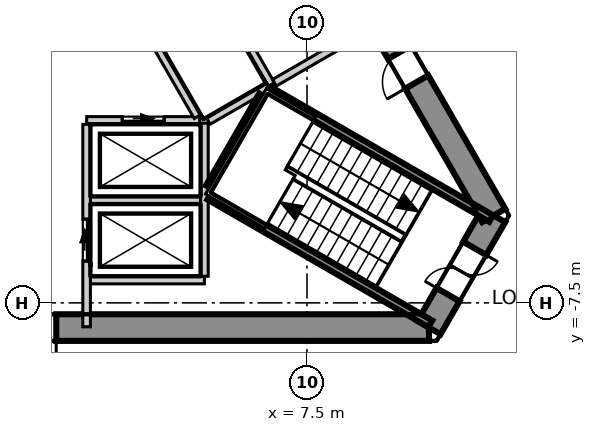
"""IFC4 building model, lengths in metres.
Left out: names, types, materials, properties, quantities, classifications, styles, units other than length and angle.
Written with IfcOpenShell. Run it as: python <this file> out.ifc"""

import sys

from ifc_helpers import new_model, si_unit, direction, frame, frame_2d, origin, place, context, subcontext, project, spatial, polyline, rectangle, outline, extrude, element, fill, save


model = new_model("IFC4")
c1 = context("Model", 3, precision=1e-05, world=origin(), true_north=direction((0.0, 1.0)))
c2 = subcontext(c1, "Body", "Model", "MODEL_VIEW")
j1 = project(units=[si_unit("LENGTHUNIT", "METRE"), si_unit("PLANEANGLEUNIT", "RADIAN")], contexts=[c1])
p1 = place(None, origin())
s1 = spatial("IfcSite", under=j1, at=p1, CompositionType="ELEMENT")
p2 = place(p1, origin())
s2 = spatial("IfcBuilding", under=s1, at=p2, CompositionType="ELEMENT")
p3 = place(p2, frame((0.0, 0.0, 227.3)))
s3 = spatial("IfcBuildingStorey", under=s2, at=p3, CompositionType="ELEMENT", Elevation=227.3)
p4 = place(p3, frame((-10.71, -8.15, -0.3), z_axis=(0.0, 0.0, 1.0), x_axis=(1.0, 0.0, 0.0)))
e1 = element("IfcWall", 1, at=p4, inside=s3, PredefinedType="SHEAR", context=c2, shape_type="SweptSolid", body=[
    extrude(outline(polyline([(-0.202, -0.35), (1.782, -0.35), (3.766, -0.35), (5.75, -0.35), (7.734, -0.35), (9.718, -0.35), (11.702, -0.35), (13.686, -0.35), (15.67, -0.35), (17.654, -0.35), (19.638, -0.35), (21.622, -0.35), (21.218, 0.35), (19.307, 0.35), (17.397, 0.35), (15.486, 0.35), (13.576, 0.35), (11.665, 0.35), (9.755, 0.35), (7.844, 0.35), (5.934, 0.35), (4.023, 0.35), (2.113, 0.35), (0.202, 0.35), (-0.202, -0.35)])), origin(), (0.0, 0.0, 1.0), 4.0),
])
p5 = place(p4, frame((9.81, 0.0, 0.3)))
e2 = element("IfcOpeningElement", 2, at=p5, cuts=e1, PredefinedType="OPENING", context=c2, shape_type="SweptSolid", body=[
    extrude(rectangle(XDim=1.8, YDim=2.1, at=frame_2d((0.9, 1.05))), frame((0.0, 0.36, 0.0), z_axis=(0.0, -1.0, 0.0), x_axis=(1.0, 0.0, 0.0)), (0.0, 0.0, 1.0), 0.72),
])
p6 = place(p3, frame((10.71, -8.15, -0.3), z_axis=(0.0, 0.0, 1.0), x_axis=(0.49999337185, 0.866029230515, 0.0)))
e3 = element("IfcWall", 3, at=p6, inside=s3, PredefinedType="SHEAR", context=c2, shape_type="SweptSolid", body=[
    extrude(outline(polyline([(-0.202, -0.35), (1.703, -0.35), (3.608, -0.35), (3.204, 0.35), (1.703, 0.35), (0.202, 0.35), (-0.202, -0.35)])), origin(), (0.0, 0.0, 1.0), 4.0),
])
p7 = place(p6, frame((1.003, 0.0, 0.3)))
e4 = element("IfcOpeningElement", 4, at=p7, cuts=e3, PredefinedType="OPENING", context=c2, shape_type="SweptSolid", body=[
    extrude(rectangle(XDim=1.4, YDim=2.1, at=frame_2d((0.7, 1.05))), frame((0.0, 0.36, 0.0), z_axis=(0.0, -1.0, 0.0), x_axis=(1.0, 0.0, 0.0)), (0.0, 0.0, 1.0), 0.72),
])
p8 = place(p3, frame((12.413, -5.2, -0.3), z_axis=(0.0, 0.0, 1.0), x_axis=(-0.500011533395, 0.866018744874, 0.0)))
e5 = element("IfcWall", 5, at=p8, inside=s3, PredefinedType="SHEAR", context=c2, shape_type="SweptSolid", body=[
    extrude(outline(polyline([(-0.202, -0.35), (1.782, -0.35), (3.766, -0.35), (5.75, -0.35), (7.734, -0.35), (9.718, -0.35), (11.702, -0.35), (13.686, -0.35), (15.67, -0.35), (17.654, -0.35), (19.638, -0.35), (21.622, -0.35), (21.218, 0.35), (19.307, 0.35), (17.397, 0.35), (15.486, 0.35), (13.576, 0.35), (11.665, 0.35), (9.755, 0.35), (7.844, 0.35), (5.934, 0.35), (4.023, 0.35), (2.113, 0.35), (0.202, 0.35), (-0.202, -0.35)])), origin(), (0.0, 0.0, 1.0), 4.0),
])
p9 = place(p8, frame((4.055, 0.0, 0.3)))
e6 = element("IfcOpeningElement", 6, at=p9, cuts=e5, PredefinedType="OPENING", context=c2, shape_type="SweptSolid", body=[
    extrude(rectangle(XDim=0.9, YDim=2.1, at=frame_2d((0.45, 1.05))), frame((0.0, 0.36, 0.0), z_axis=(0.0, -1.0, 0.0), x_axis=(1.0, 0.0, 0.0)), (0.0, 0.0, 1.0), 0.72),
])
p10 = place(p8, frame((16.415, 0.0, 0.3)))
e7 = element("IfcOpeningElement", 7, at=p10, cuts=e5, PredefinedType="OPENING", context=c2, shape_type="SweptSolid", body=[
    extrude(rectangle(XDim=1.0, YDim=2.1, at=frame_2d((0.5, 1.05))), frame((0.0, 0.36, 0.0), z_axis=(0.0, -1.0, 0.0), x_axis=(1.0, 0.0, 0.0)), (0.0, 0.0, 1.0), 0.72),
])
p11 = place(p3, frame((27.782, -12.884, 0.0), z_axis=(0.0, 0.0, 1.0), x_axis=(-0.500023345841, 0.866011924637, 0.0)))
e8 = element("IfcWall", 8, at=p11, inside=s3, PredefinedType="ELEMENTEDWALL", context=c2, shape_type="SweptSolid", body=[
    extrude(rectangle(XDim=50.078, YDim=0.2, at=frame_2d((25.039, 0.0))), origin(), (0.0, 0.0, 1.0), 3.7),
])
p12 = place(p11, frame((2.171, 0.0, 0.9)))
e9 = element("IfcOpeningElement", 9, at=p12, cuts=e8, PredefinedType="OPENING", context=c2, shape_type="SweptSolid", body=[
    extrude(rectangle(XDim=4.2, YDim=2.5, at=frame_2d((2.1, 1.25))), frame((0.0, 0.11, 0.0), z_axis=(0.0, -1.0, 0.0), x_axis=(1.0, 0.0, 0.0)), (0.0, 0.0, 1.0), 0.22),
])
p13 = place(p11, frame((8.108, 0.0, 0.9)))
e10 = element("IfcOpeningElement", 10, at=p13, cuts=e8, PredefinedType="OPENING", context=c2, shape_type="SweptSolid", body=[
    extrude(rectangle(XDim=4.2, YDim=2.5, at=frame_2d((2.1, 1.25))), frame((0.0, 0.11, 0.0), z_axis=(0.0, -1.0, 0.0), x_axis=(1.0, 0.0, 0.0)), (0.0, 0.0, 1.0), 0.22),
])
p14 = place(p11, frame((14.044, 0.0, 0.9)))
e11 = element("IfcOpeningElement", 11, at=p14, cuts=e8, PredefinedType="OPENING", context=c2, shape_type="SweptSolid", body=[
    extrude(rectangle(XDim=4.2, YDim=2.5, at=frame_2d((2.1, 1.25))), frame((0.0, 0.11, 0.0), z_axis=(0.0, -1.0, 0.0), x_axis=(1.0, 0.0, 0.0)), (0.0, 0.0, 1.0), 0.22),
])
p15 = place(p11, frame((19.981, 0.0, 0.9)))
e12 = element("IfcOpeningElement", 12, at=p15, cuts=e8, PredefinedType="OPENING", context=c2, shape_type="SweptSolid", body=[
    extrude(rectangle(XDim=4.2, YDim=2.5, at=frame_2d((2.1, 1.25))), frame((0.0, 0.11, 0.0), z_axis=(0.0, -1.0, 0.0), x_axis=(1.0, 0.0, 0.0)), (0.0, 0.0, 1.0), 0.22),
])
p16 = place(p11, frame((25.917, 0.0, 0.9)))
e13 = element("IfcOpeningElement", 13, at=p16, cuts=e8, PredefinedType="OPENING", context=c2, shape_type="SweptSolid", body=[
    extrude(rectangle(XDim=4.2, YDim=2.5, at=frame_2d((2.1, 1.25))), frame((0.0, 0.11, 0.0), z_axis=(0.0, -1.0, 0.0), x_axis=(1.0, 0.0, 0.0)), (0.0, 0.0, 1.0), 0.22),
])
p17 = place(p11, frame((31.854, 0.0, 0.9)))
e14 = element("IfcOpeningElement", 14, at=p17, cuts=e8, PredefinedType="OPENING", context=c2, shape_type="SweptSolid", body=[
    extrude(rectangle(XDim=4.2, YDim=2.5, at=frame_2d((2.1, 1.25))), frame((0.0, 0.11, 0.0), z_axis=(0.0, -1.0, 0.0), x_axis=(1.0, 0.0, 0.0)), (0.0, 0.0, 1.0), 0.22),
])
p18 = place(p11, frame((37.79, 0.0, 0.9)))
e15 = element("IfcOpeningElement", 15, at=p18, cuts=e8, PredefinedType="OPENING", context=c2, shape_type="SweptSolid", body=[
    extrude(rectangle(XDim=4.2, YDim=2.5, at=frame_2d((2.1, 1.25))), frame((0.0, 0.11, 0.0), z_axis=(0.0, -1.0, 0.0), x_axis=(1.0, 0.0, 0.0)), (0.0, 0.0, 1.0), 0.22),
])
p19 = place(p11, frame((43.727, 0.0, 0.9)))
e16 = element("IfcOpeningElement", 16, at=p19, cuts=e8, PredefinedType="OPENING", context=c2, shape_type="SweptSolid", body=[
    extrude(rectangle(XDim=4.2, YDim=2.5, at=frame_2d((2.1, 1.25))), frame((0.0, 0.11, 0.0), z_axis=(0.0, -1.0, 0.0), x_axis=(1.0, 0.0, 0.0)), (0.0, 0.0, 1.0), 0.22),
])
p20 = place(p3, frame((0.075, 24.07, 0.0), z_axis=(0.0, 0.0, 1.0), x_axis=(0.49999939571, -0.866025752671, 0.0)))
e17 = element("IfcWall", 17, at=p20, inside=s3, PredefinedType="PARTITIONING", context=c2, shape_type="SweptSolid", body=[
    extrude(rectangle(XDim=41.614, YDim=0.15, at=frame_2d((20.807, 0.0))), origin(), (0.0, 0.0, 1.0), 3.7),
])
p21 = place(p20, frame((36.714, 0.0, 0.0)))
e18 = element("IfcOpeningElement", 18, at=p21, cuts=e17, PredefinedType="OPENING", context=c2, shape_type="SweptSolid", body=[
    extrude(rectangle(XDim=1.1, YDim=2.1, at=frame_2d((0.55, 1.05))), frame((0.0, 0.085, 0.0), z_axis=(0.0, -1.0, 0.0), x_axis=(1.0, 0.0, 0.0)), (0.0, 0.0, 1.0), 0.17),
])
p22 = place(p20, frame((21.831, 0.0, 0.0)))
e19 = element("IfcOpeningElement", 19, at=p22, cuts=e17, PredefinedType="OPENING", context=c2, shape_type="SweptSolid", body=[
    extrude(rectangle(XDim=1.1, YDim=2.1, at=frame_2d((0.55, 1.05))), frame((0.0, 0.085, 0.0), z_axis=(0.0, -1.0, 0.0), x_axis=(1.0, 0.0, 0.0)), (0.0, 0.0, 1.0), 0.17),
])
p23 = place(p20, frame((30.631, 0.0, 0.0)))
e20 = element("IfcOpeningElement", 20, at=p23, cuts=e17, PredefinedType="OPENING", context=c2, shape_type="SweptSolid", body=[
    extrude(rectangle(XDim=0.9, YDim=2.1, at=frame_2d((0.45, 1.05))), frame((0.0, 0.085, 0.0), z_axis=(0.0, -1.0, 0.0), x_axis=(1.0, 0.0, 0.0)), (0.0, 0.0, 1.0), 0.17),
])
p24 = place(p20, frame((27.431, 0.0, 0.0)))
e21 = element("IfcOpeningElement", 21, at=p24, cuts=e17, PredefinedType="OPENING", context=c2, shape_type="SweptSolid", body=[
    extrude(rectangle(XDim=0.9, YDim=2.1, at=frame_2d((0.45, 1.05))), frame((0.0, 0.085, 0.0), z_axis=(0.0, -1.0, 0.0), x_axis=(1.0, 0.0, 0.0)), (0.0, 0.0, 1.0), 0.17),
])
p25 = place(p20, frame((24.631, 0.0, 0.0)))
e22 = element("IfcOpeningElement", 22, at=p25, cuts=e17, PredefinedType="OPENING", context=c2, shape_type="SweptSolid", body=[
    extrude(rectangle(XDim=1.0, YDim=2.1, at=frame_2d((0.5, 1.05))), frame((0.0, 0.085, 0.0), z_axis=(0.0, -1.0, 0.0), x_axis=(1.0, 0.0, 0.0)), (0.0, 0.0, 1.0), 0.17),
])
p26 = place(p20, frame((14.358, 0.0, 0.0)))
e23 = element("IfcOpeningElement", 23, at=p26, cuts=e17, PredefinedType="OPENING", context=c2, shape_type="SweptSolid", body=[
    extrude(rectangle(XDim=1.1, YDim=2.1, at=frame_2d((0.55, 1.05))), frame((0.0, 0.085, 0.0), z_axis=(0.0, -1.0, 0.0), x_axis=(1.0, 0.0, 0.0)), (0.0, 0.0, 1.0), 0.17),
])
p27 = place(p20, frame((3.885, 0.0, 0.0)))
e24 = element("IfcOpeningElement", 24, at=p27, cuts=e17, PredefinedType="OPENING", context=c2, shape_type="SweptSolid", body=[
    extrude(rectangle(XDim=1.1, YDim=2.1, at=frame_2d((0.55, 1.05))), frame((0.0, 0.085, 0.0), z_axis=(0.0, -1.0, 0.0), x_axis=(1.0, 0.0, 0.0)), (0.0, 0.0, 1.0), 0.17),
])
p28 = place(p3, frame((1.8, -4.8, 0.0), z_axis=(0.0, 0.0, 1.0), x_axis=(1.0, 0.0, 0.0)))
e25 = element("IfcWall", 25, at=p28, inside=s3, PredefinedType="SOLIDWALL", context=c2, shape_type="SweptSolid", body=[
    extrude(rectangle(XDim=2.9, YDim=0.2, at=frame_2d((1.45, 0.0))), origin(), (0.0, 0.0, 1.0), 3.7),
])
p29 = place(p3, frame((1.8, -6.9, 0.0), z_axis=(0.0, 0.0, 1.0), x_axis=(1.0, 0.0, 0.0)))
e26 = element("IfcWall", 26, at=p29, inside=s3, PredefinedType="SOLIDWALL", context=c2, shape_type="SweptSolid", body=[
    extrude(rectangle(XDim=3.0, YDim=0.2, at=frame_2d((1.5, 0.0))), origin(), (0.0, 0.0, 1.0), 3.7),
])
p30 = place(p3, frame((1.703, -2.7, 0.0), z_axis=(0.0, 0.0, 1.0), x_axis=(1.0, 0.0, 0.0)))
e27 = element("IfcWall", 27, at=p30, inside=s3, PredefinedType="SOLIDWALL", context=c2, shape_type="SweptSolid", body=[
    extrude(rectangle(XDim=2.973, YDim=0.2, at=frame_2d((1.487, 0.0))), origin(), (0.0, 0.0, 1.0), 3.7),
])
p31 = place(p30, frame((0.936, 0.0, 0.0)))
e28 = element("IfcOpeningElement", 28, at=p31, cuts=e27, PredefinedType="OPENING", context=c2, shape_type="SweptSolid", body=[
    extrude(rectangle(XDim=1.1, YDim=2.1, at=frame_2d((0.55, 1.05))), frame((0.0, 0.11, 0.0), z_axis=(0.0, -1.0, 0.0), x_axis=(1.0, 0.0, 0.0)), (0.0, 0.0, 1.0), 0.22),
])
p32 = place(p3, frame((3.19, -0.125, 0.0), z_axis=(0.0, 0.0, 1.0), x_axis=(0.499988658015, -0.866031951983, 0.0)))
e29 = element("IfcWall", 29, at=p32, inside=s3, PredefinedType="SOLIDWALL", context=c2, shape_type="SweptSolid", body=[
    extrude(rectangle(XDim=2.858, YDim=0.2, at=frame_2d((1.429, 0.0))), origin(), (0.0, 0.0, 1.0), 3.7),
])
p33 = place(p3, frame((1.7, -8.13, 0.0), z_axis=(0.0, 0.0, 1.0), x_axis=(0.0, 1.0, 0.0)))
e30 = element("IfcWall", 30, at=p33, inside=s3, PredefinedType="SOLIDWALL", context=c2, shape_type="SweptSolid", body=[
    extrude(rectangle(XDim=5.327, YDim=0.2, at=frame_2d((2.664, 0.0))), origin(), (0.0, 0.0, 1.0), 3.7),
])
p34 = place(p33, frame((1.73, 0.0, 0.0)))
e31 = element("IfcOpeningElement", 31, at=p34, cuts=e30, PredefinedType="OPENING", context=c2, shape_type="SweptSolid", body=[
    extrude(rectangle(XDim=1.1, YDim=2.1, at=frame_2d((0.55, 1.05))), frame((0.0, 0.11, 0.0), z_axis=(0.0, -1.0, 0.0), x_axis=(1.0, 0.0, 0.0)), (0.0, 0.0, 1.0), 0.22),
])
p35 = place(p3, frame((4.8, -6.8, 0.0), z_axis=(0.0, 0.0, 1.0), x_axis=(0.0, 1.0, 0.0)))
e32 = element("IfcWall", 32, at=p35, inside=s3, PredefinedType="SOLIDWALL", context=c2, shape_type="SweptSolid", body=[
    extrude(rectangle(XDim=4.029, YDim=0.2, at=frame_2d((2.015, 0.0))), origin(), (0.0, 0.0, 1.0), 3.7),
])
p36 = place(p3, frame((5.057, 0.841, 0.0), z_axis=(0.0, 0.0, 1.0), x_axis=(0.499990139034, -0.866031096941, 0.0)))
e33 = element("IfcWall", 33, at=p36, inside=s3, PredefinedType="SOLIDWALL", context=c2, shape_type="SweptSolid", body=[
    extrude(rectangle(XDim=3.0, YDim=0.2, at=frame_2d((1.5, 0.0))), origin(), (0.0, 0.0, 1.0), 3.7),
])
p37 = place(p3, frame((4.9, -2.714, 0.0), z_axis=(0.0, 0.0, 1.0), x_axis=(0.865846928409, 0.500309001083, 0.0)))
e34 = element("IfcWall", 34, at=p37, inside=s3, PredefinedType="SOLIDWALL", context=c2, shape_type="SweptSolid", body=[
    extrude(rectangle(XDim=1.813, YDim=0.2, at=frame_2d((0.907, 0.0))), origin(), (0.0, 0.0, 1.0), 3.7),
])
p38 = place(p3, frame((6.642, -1.708, 0.0), z_axis=(0.0, 0.0, 1.0), x_axis=(0.866043441391, 0.499968756647, 0.0)))
e35 = element("IfcWall", 35, at=p38, inside=s3, PredefinedType="SOLIDWALL", context=c2, shape_type="SweptSolid", body=[
    extrude(rectangle(XDim=2.002, YDim=0.2, at=frame_2d((1.001, 0.0))), origin(), (0.0, 0.0, 1.0), 3.7),
])
p39 = place(p3, frame((4.929, -4.693, 0.0), z_axis=(0.0, 0.0, 1.0), x_axis=(0.865983344943, -0.500072840975, 0.0)))
e36 = element("IfcWall", 36, at=p39, inside=s3, PredefinedType="SOLIDWALL", context=c2, shape_type="SweptSolid", body=[
    extrude(rectangle(XDim=6.715, YDim=0.2, at=frame_2d((3.357, 0.0))), origin(), (0.0, 0.0, 1.0), 3.7),
])
p40 = place(p3, frame((4.929, -4.462, 0.0), z_axis=(0.0, 0.0, 1.0), x_axis=(0.500200581029, 0.865909567298, 0.0)))
e37 = element("IfcWall", 37, at=p40, inside=s3, PredefinedType="SOLIDWALL", context=c2, shape_type="SweptSolid", body=[
    extrude(rectangle(XDim=2.799, YDim=0.2, at=frame_2d((1.399, 0.0))), origin(), (0.0, 0.0, 1.0), 3.7),
])
p41 = place(p3, frame((6.529, -1.922, 0.0), z_axis=(0.0, 0.0, 1.0), x_axis=(0.866046323291, -0.499963764601, 0.0)))
e38 = element("IfcWall", 38, at=p41, inside=s3, PredefinedType="SOLIDWALL", context=c2, shape_type="SweptSolid", body=[
    extrude(rectangle(XDim=6.714, YDim=0.2, at=frame_2d((3.357, 0.0))), origin(), (0.0, 0.0, 1.0), 3.7),
])
p42 = place(p31, origin())
e39 = element("IfcDoor", 39, at=p42, inside=s3, OperationType="SLIDING_TO_LEFT", PredefinedType="DOOR", context=c2, shape_type="SweptSolid", body=[
    extrude(rectangle(XDim=1.1, YDim=2.1, at=frame_2d((0.55, 1.05))), frame((0.0, 0.025, 0.0), z_axis=(0.0, -1.0, 0.0), x_axis=(1.0, 0.0, 0.0)), (0.0, 0.0, 1.0), 0.05),
])
fill(e28, e39)
p43 = place(p34, origin())
e40 = element("IfcDoor", 40, at=p43, inside=s3, OperationType="SLIDING_TO_LEFT", PredefinedType="DOOR", context=c2, shape_type="SweptSolid", body=[
    extrude(rectangle(XDim=1.1, YDim=2.1, at=frame_2d((0.55, 1.05))), frame((0.0, 0.025, 0.0), z_axis=(0.0, -1.0, 0.0), x_axis=(1.0, 0.0, 0.0)), (0.0, 0.0, 1.0), 0.05),
])
fill(e31, e40)
p44 = place(p5, origin())
e41 = element("IfcDoor", 41, at=p44, inside=s3, OperationType="DOUBLE_DOOR_SINGLE_SWING", PredefinedType="DOOR", context=c2, shape_type="SweptSolid", body=[
    extrude(rectangle(XDim=1.8, YDim=2.1, at=frame_2d((0.9, 1.05))), frame((0.0, 0.025, 0.0), z_axis=(0.0, -1.0, 0.0), x_axis=(1.0, 0.0, 0.0)), (0.0, 0.0, 1.0), 0.05),
])
fill(e2, e41)
p45 = place(p7, origin())
e42 = element("IfcDoor", 42, at=p45, inside=s3, OperationType="DOUBLE_DOOR_SINGLE_SWING", PredefinedType="DOOR", context=c2, shape_type="SweptSolid", body=[
    extrude(rectangle(XDim=1.4, YDim=2.1, at=frame_2d((0.7, 1.05))), frame((0.0, 0.025, 0.0), z_axis=(0.0, -1.0, 0.0), x_axis=(1.0, 0.0, 0.0)), (0.0, 0.0, 1.0), 0.05),
])
fill(e4, e42)
p46 = place(p9, origin())
e43 = element("IfcDoor", 43, at=p46, inside=s3, OperationType="SINGLE_SWING_RIGHT", PredefinedType="DOOR", context=c2, shape_type="SweptSolid", body=[
    extrude(rectangle(XDim=0.9, YDim=2.1, at=frame_2d((0.45, 1.05))), frame((0.0, 0.025, 0.0), z_axis=(0.0, -1.0, 0.0), x_axis=(1.0, 0.0, 0.0)), (0.0, 0.0, 1.0), 0.05),
])
fill(e6, e43)
save(model, sys.argv[1])
